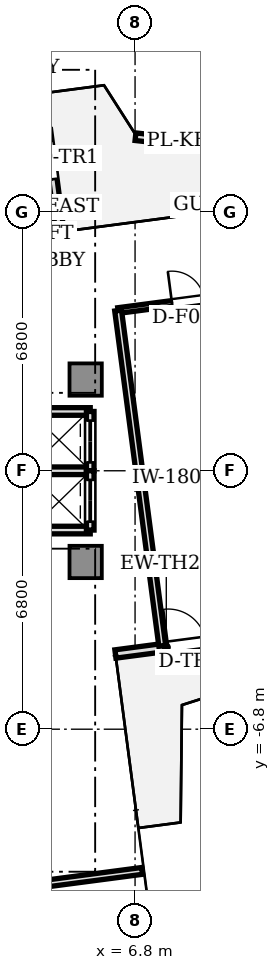
"""IFC4 building model, lengths in metres.
Left out: names, types, materials, properties, quantities, classifications, styles, units other than length and angle.
Written with IfcOpenShell. Run it as: python <this file> out.ifc"""

import sys

from ifc_helpers import new_model, si_unit, direction, frame, frame_2d, origin, origin_2d, place, context, subcontext, project, spatial, rectangle, extrude, source, transform, mapped, element, fill, save


model = new_model("IFC4")
c1 = context("Model", 3, precision=1e-05, world=origin(), true_north=direction((0.0, 1.0)))
c2 = subcontext(c1, "Body", "Model", "MODEL_VIEW")
j1 = project(units=[si_unit("LENGTHUNIT", "METRE"), si_unit("PLANEANGLEUNIT", "RADIAN")], contexts=[c1])
p1 = place(None, origin())
s1 = spatial("IfcSite", under=j1, at=p1, CompositionType="ELEMENT")
p2 = place(p1, origin())
s2 = spatial("IfcBuilding", under=s1, at=p2, CompositionType="ELEMENT")
p3 = place(p2, frame((0.0, 0.0, 269.1)))
s3 = spatial("IfcBuildingStorey", under=s2, at=p3, CompositionType="ELEMENT", Elevation=269.1)
m1 = source(origin(), c2, "Body", "SweptSolid", [
    extrude(rectangle(XDim=0.85, YDim=0.85, at=origin_2d()), origin(), (0.0, 0.0, 1.0), 3.11),
])
for number, where, z_axis, x_axis in (
    (1, (5.5, 2.4, 0.0), (0.0, 0.0, 1.0), (1.0, 0.0, 0.0)),
    (2, (5.5, -2.4, 0.0), (0.0, 0.0, 1.0), (1.0, 0.0, 0.0)),
):
    element("IfcColumn", number, at=place(p3, frame(where, z_axis=z_axis, x_axis=x_axis)), inside=s3, PredefinedType="COLUMN", context=c2, shape_type="MappedRepresentation", body=[
        mapped(m1, transform((0.0, 0.0, 0.0), scale=1.0)),
    ])
p4 = place(p3, frame((6.283, -4.821, 0.0), z_axis=(0.0, 0.0, 1.0), x_axis=(0.991451525486, 0.130475563272, 0.0)))
e3 = element("IfcWall", 3, at=p4, inside=s3, PredefinedType="STANDARD", context=c2, shape_type="SweptSolid", body=[
    extrude(rectangle(XDim=2.7, YDim=0.22, at=frame_2d((1.35, 0.0))), origin(), (0.0, 0.0, 1.0), 3.11),
])
p5 = place(p4, frame((1.4, 0.0, 0.0)))
e4 = element("IfcOpeningElement", 4, at=p5, cuts=e3, PredefinedType="OPENING", context=c2, shape_type="SweptSolid", body=[
    extrude(rectangle(XDim=1.0, YDim=2.2, at=frame_2d((0.5, 1.1))), frame((0.0, 0.12, 0.0), z_axis=(0.0, -1.0, 0.0), x_axis=(1.0, 0.0, 0.0)), (0.0, 0.0, 1.0), 0.24),
])
p6 = place(p3, frame((4.821, 6.283, 0.0), z_axis=(0.0, 0.0, 1.0), x_axis=(-0.130475563272, 0.991451525486, 0.0)))
e5 = element("IfcWall", 5, at=p6, inside=s3, PredefinedType="STANDARD", context=c2, shape_type="SweptSolid", body=[
    extrude(rectangle(XDim=2.7, YDim=0.22, at=frame_2d((1.35, 0.0))), origin(), (0.0, 0.0, 1.0), 3.11),
])
p7 = place(p6, frame((1.4, 0.0, 0.0)))
e6 = element("IfcOpeningElement", 6, at=p7, cuts=e5, PredefinedType="OPENING", context=c2, shape_type="SweptSolid", body=[
    extrude(rectangle(XDim=1.0, YDim=2.2, at=frame_2d((0.5, 1.1))), frame((0.0, 0.12, 0.0), z_axis=(0.0, -1.0, 0.0), x_axis=(1.0, 0.0, 0.0)), (0.0, 0.0, 1.0), 0.24),
])
p8 = place(p3, frame((9.013, 8.547, 0.0), z_axis=(0.0, 0.0, 1.0), x_axis=(-0.993982778336, 0.109536461382, 0.0)))
e7 = element("IfcWall", 7, at=p8, inside=s3, PredefinedType="PARAPET", context=c2, shape_type="SweptSolid", body=[
    extrude(rectangle(XDim=2.216, YDim=0.2, at=frame_2d((1.108, 0.0))), origin(), (0.0, 0.0, 1.0), 0.65),
])
for number, where, z_axis, x_axis in (
    (8, (3.98, 1.56, 0.0), (0.0, 0.0, 1.0), (1.0, 0.0, 0.0)),
    (9, (3.98, -1.56, 0.0), (0.0, 0.0, 1.0), (1.0, 0.0, 0.0)),
    (10, (3.98, 0.0, 0.0), (0.0, 0.0, 1.0), (1.0, 0.0, 0.0)),
):
    element("IfcWall", number, at=place(p3, frame(where, z_axis=z_axis, x_axis=x_axis)), inside=s3, PredefinedType="SOLIDWALL", context=c2, shape_type="SweptSolid", body=[
        extrude(rectangle(XDim=1.64, YDim=0.2, at=frame_2d((0.82, 0.0))), origin(), (0.0, 0.0, 1.0), 2.66),
    ])
p9 = place(p3, frame((5.62, 0.0, 0.0), z_axis=(0.0, 0.0, 1.0), x_axis=(0.0, 1.0, 0.0)))
e11 = element("IfcWall", 11, at=p9, inside=s3, PredefinedType="SOLIDWALL", context=c2, shape_type="SweptSolid", body=[
    extrude(rectangle(XDim=1.56, YDim=0.2, at=frame_2d((0.78, 0.0))), origin(), (0.0, 0.0, 1.0), 2.66),
])
p10 = place(p9, frame((0.22, 0.0, 0.0)))
e12 = element("IfcOpeningElement", 12, at=p10, cuts=e11, PredefinedType="OPENING", context=c2, shape_type="SweptSolid", body=[
    extrude(rectangle(XDim=1.1, YDim=2.2, at=frame_2d((0.55, 1.1))), frame((0.0, 0.11, 0.0), z_axis=(0.0, -1.0, 0.0), x_axis=(1.0, 0.0, 0.0)), (0.0, 0.0, 1.0), 0.22),
])
p11 = place(p3, frame((5.62, -1.56, 0.0), z_axis=(0.0, 0.0, 1.0), x_axis=(0.0, 1.0, 0.0)))
e13 = element("IfcWall", 13, at=p11, inside=s3, PredefinedType="SOLIDWALL", context=c2, shape_type="SweptSolid", body=[
    extrude(rectangle(XDim=1.56, YDim=0.2, at=frame_2d((0.78, 0.0))), origin(), (0.0, 0.0, 1.0), 2.66),
])
p12 = place(p11, frame((0.22, 0.0, 0.0)))
e14 = element("IfcOpeningElement", 14, at=p12, cuts=e13, PredefinedType="OPENING", context=c2, shape_type="SweptSolid", body=[
    extrude(rectangle(XDim=1.1, YDim=2.2, at=frame_2d((0.55, 1.1))), frame((0.0, 0.11, 0.0), z_axis=(0.0, -1.0, 0.0), x_axis=(1.0, 0.0, 0.0)), (0.0, 0.0, 1.0), 0.22),
])
p13 = place(p3, frame((6.354, 4.215, 0.0), z_axis=(0.0, 0.0, 1.0), x_axis=(0.991441861772, 0.130548974432, 0.0)))
e15 = element("IfcWall", 15, at=p13, inside=s3, PredefinedType="PARTITIONING", context=c2, shape_type="SweptSolid", body=[
    extrude(rectangle(XDim=8.29, YDim=0.15, at=frame_2d((4.145, 0.0))), origin(), (0.0, 0.0, 1.0), 2.66),
])
p14 = place(p13, frame((1.431, 0.0, 0.0)))
e16 = element("IfcOpeningElement", 16, at=p14, cuts=e15, PredefinedType="OPENING", context=c2, shape_type="SweptSolid", body=[
    extrude(rectangle(XDim=0.85, YDim=2.1, at=frame_2d((0.425, 1.05))), frame((0.0, 0.085, 0.0), z_axis=(0.0, -1.0, 0.0), x_axis=(1.0, 0.0, 0.0)), (0.0, 0.0, 1.0), 0.17),
])
p15 = place(p13, frame((4.602, 0.0, 0.0)))
e17 = element("IfcOpeningElement", 17, at=p15, cuts=e15, PredefinedType="OPENING", context=c2, shape_type="SweptSolid", body=[
    extrude(rectangle(XDim=0.85, YDim=2.1, at=frame_2d((0.425, 1.05))), frame((0.0, 0.085, 0.0), z_axis=(0.0, -1.0, 0.0), x_axis=(1.0, 0.0, 0.0)), (0.0, 0.0, 1.0), 0.17),
])
p16 = place(p3, frame((7.516, -4.608, 0.0), z_axis=(0.0, 0.0, 1.0), x_axis=(-0.130548179903, 0.991441966392, 0.0)))
e18 = element("IfcWall", 18, at=p16, inside=s3, PredefinedType="PARTITIONING", context=c2, shape_type="SweptSolid", body=[
    extrude(rectangle(XDim=8.9, YDim=0.18, at=frame_2d((4.45, 0.0))), origin(), (0.0, 0.0, 1.0), 2.66),
])
p17 = place(p3, frame((2.423, -11.129, 0.0), z_axis=(0.0, 0.0, 1.0), x_axis=(0.991446706518, 0.130512176195, 0.0)))
e19 = element("IfcWall", 19, at=p17, inside=s3, PredefinedType="PARTITIONING", context=c2, shape_type="SweptSolid", body=[
    extrude(rectangle(XDim=4.6, YDim=0.18, at=frame_2d((2.3, 0.0))), origin(), (0.0, 0.0, 1.0), 2.66),
])
m2 = source(origin(), c2, "Body", "SweptSolid", [
    extrude(rectangle(XDim=1.0, YDim=0.05, at=origin_2d()), origin(), (0.0, 0.0, 1.0), 2.2),
])
p18 = place(p5, frame((0.5, 0.0, 0.0)))
e20 = element("IfcDoor", 20, at=p18, inside=s3, OperationType="SINGLE_SWING_LEFT", PredefinedType="DOOR", context=c2, shape_type="MappedRepresentation", body=[
    mapped(m2, transform((0.0, 0.0, 0.0), scale=1.0)),
])
fill(e4, e20)
p19 = place(p7, frame((0.5, 0.0, 0.0)))
e21 = element("IfcDoor", 21, at=p19, inside=s3, OperationType="SINGLE_SWING_LEFT", PredefinedType="DOOR", context=c2, shape_type="MappedRepresentation", body=[
    mapped(m2, transform((0.0, 0.0, 0.0), scale=1.0)),
])
fill(e6, e21)
m3 = source(origin(), c2, "Body", "SweptSolid", [
    extrude(rectangle(XDim=1.1, YDim=0.05, at=origin_2d()), origin(), (0.0, 0.0, 1.0), 2.2),
])
p20 = place(p10, frame((0.55, 0.0, 0.0)))
e22 = element("IfcDoor", 22, at=p20, inside=s3, OperationType="DOUBLE_DOOR_SLIDING", PredefinedType="DOOR", context=c2, shape_type="MappedRepresentation", body=[
    mapped(m3, transform((0.0, 0.0, 0.0), scale=1.0)),
])
fill(e12, e22)
p21 = place(p12, frame((0.55, 0.0, 0.0)))
e23 = element("IfcDoor", 23, at=p21, inside=s3, OperationType="DOUBLE_DOOR_SLIDING", PredefinedType="DOOR", context=c2, shape_type="MappedRepresentation", body=[
    mapped(m3, transform((0.0, 0.0, 0.0), scale=1.0)),
])
fill(e14, e23)
m4 = source(origin(), c2, "Body", "SweptSolid", [
    extrude(rectangle(XDim=0.85, YDim=0.05, at=origin_2d()), origin(), (0.0, 0.0, 1.0), 2.1),
])
p22 = place(p14, frame((0.425, 0.0, 0.0)))
e24 = element("IfcDoor", 24, at=p22, inside=s3, OperationType="SINGLE_SWING_LEFT", PredefinedType="DOOR", context=c2, shape_type="MappedRepresentation", body=[
    mapped(m4, transform((0.0, 0.0, 0.0), scale=1.0)),
])
fill(e16, e24)
save(model, sys.argv[1])
